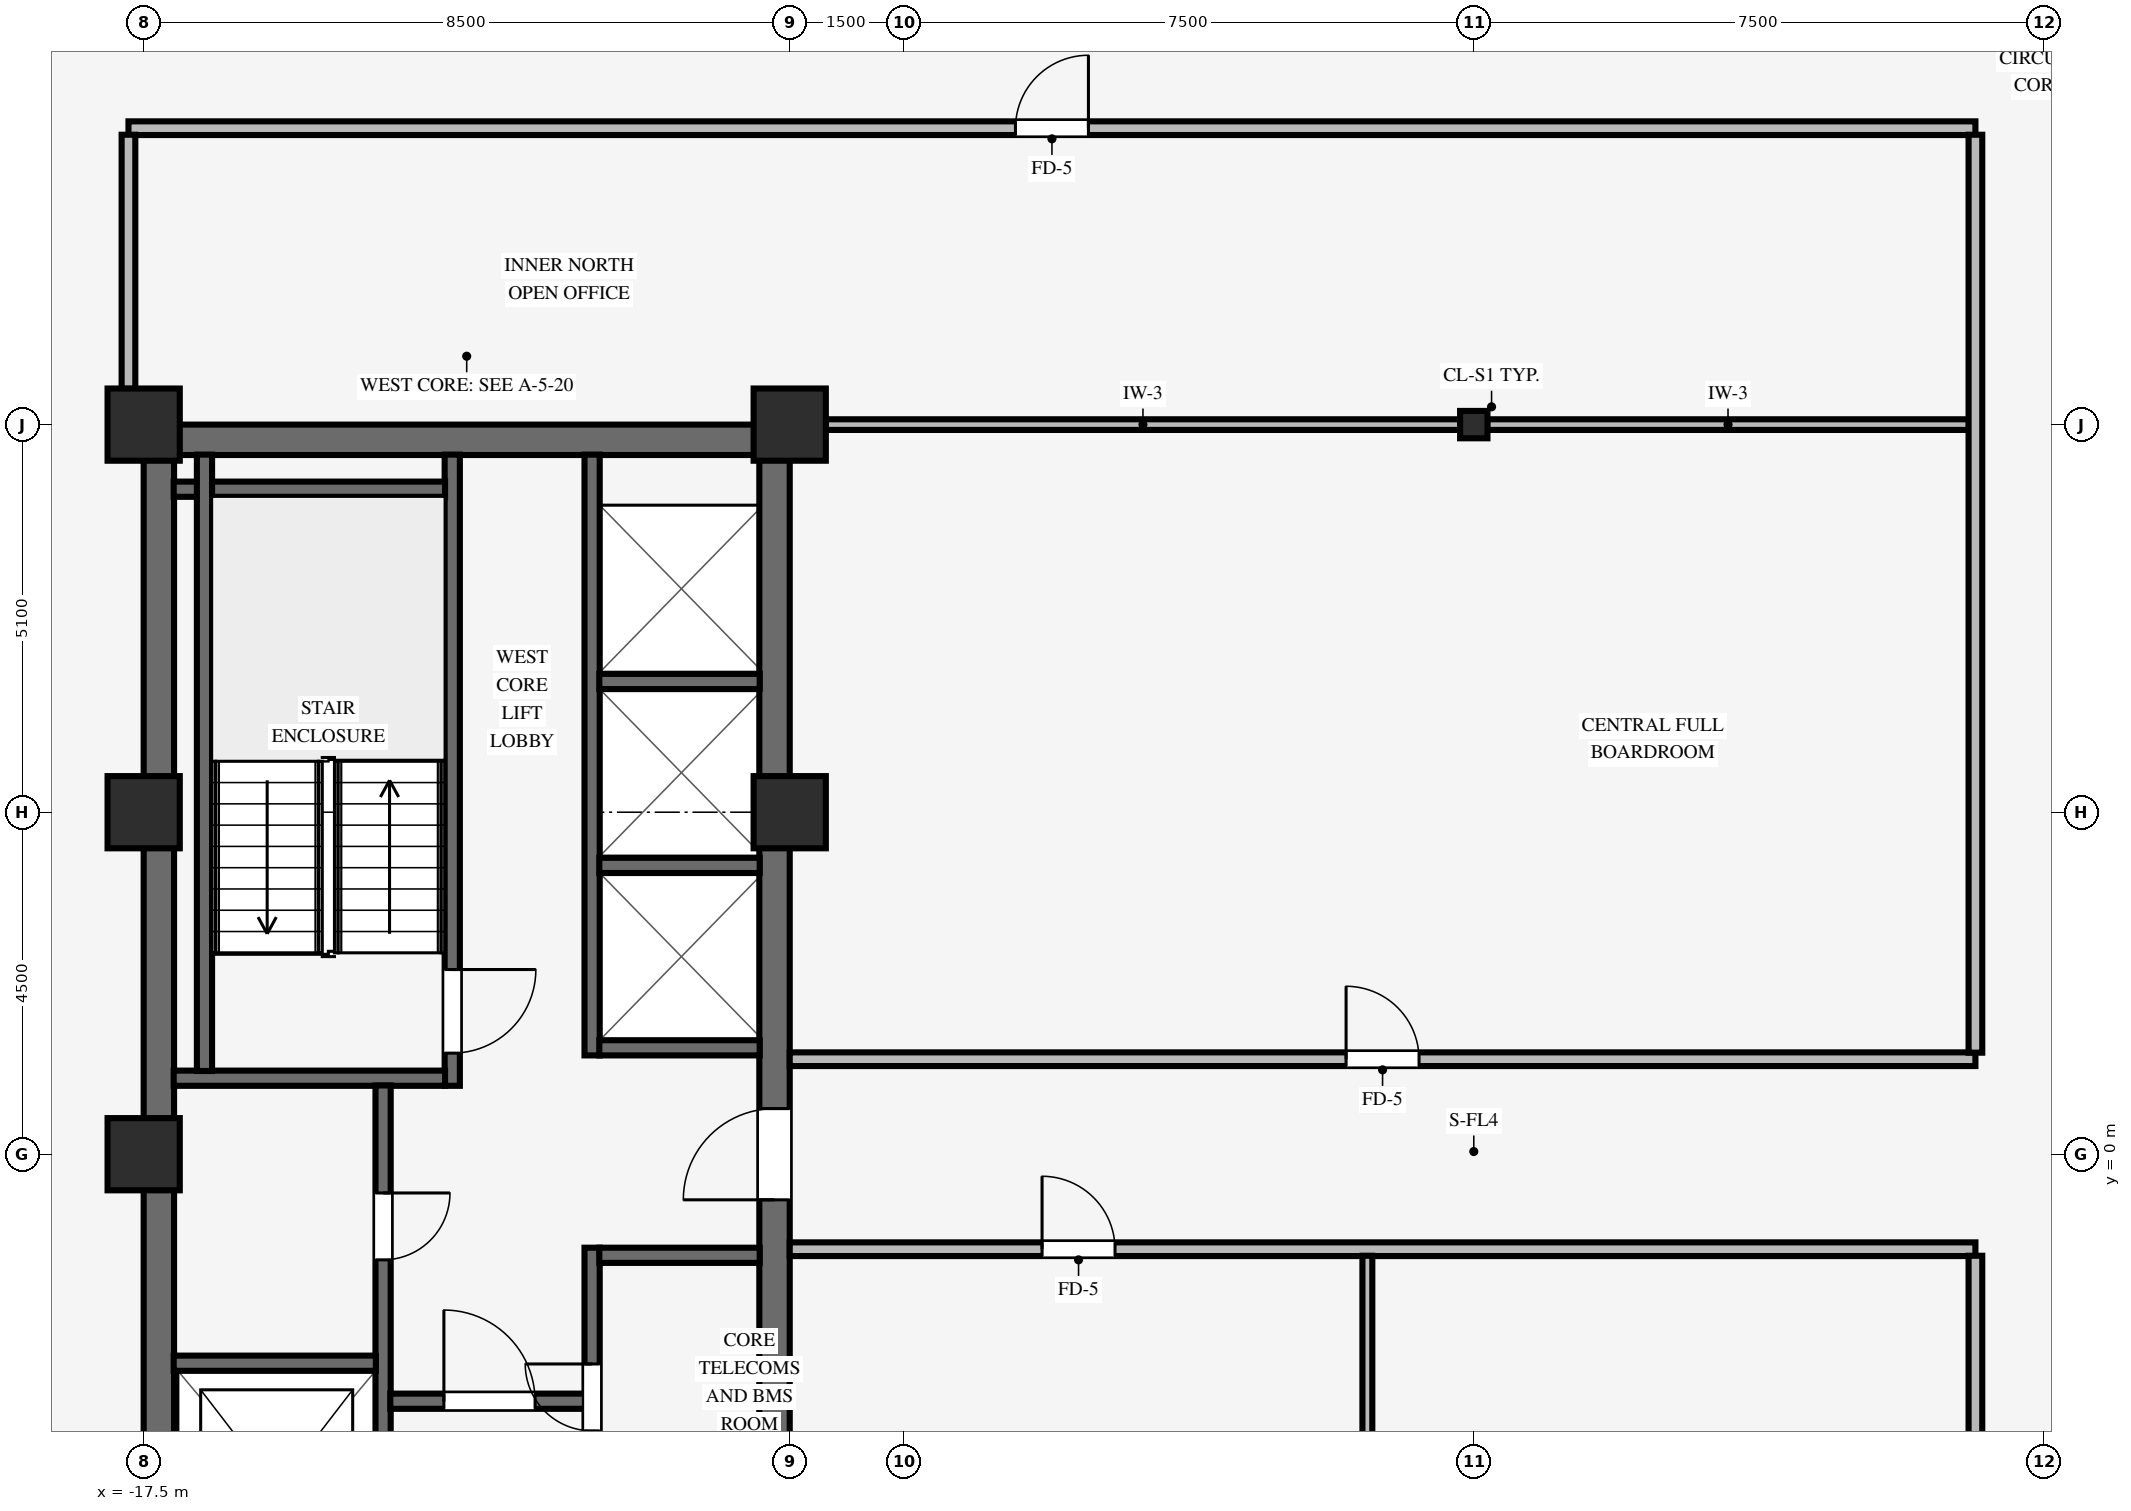
"""IFC4 building model, lengths in metres.
Left out: names, types, materials, properties, quantities, classifications, styles, units other than length and angle.
Written with IfcOpenShell. Run it as: python <this file> out.ifc"""

import sys

from ifc_helpers import new_model, si_unit, direction, frame, frame_2d, origin, origin_2d, place, context, subcontext, project, spatial, rectangle, i_section, extrude, source, transform, mapped, element, fill, save


model = new_model("IFC4")
c1 = context("Model", 3, precision=1e-05, world=origin(), true_north=direction((0.0, 1.0)))
c2 = subcontext(c1, "Body", "Model", "MODEL_VIEW")
j1 = project(units=[si_unit("LENGTHUNIT", "METRE"), si_unit("PLANEANGLEUNIT", "RADIAN")], contexts=[c1])
p1 = place(None, origin())
s1 = spatial("IfcSite", under=j1, at=p1, CompositionType="ELEMENT")
p2 = place(p1, origin())
s2 = spatial("IfcBuilding", under=s1, at=p2, CompositionType="ELEMENT")
p3 = place(p2, frame((0.0, 0.0, 156.7)))
s3 = spatial("IfcBuildingStorey", under=s2, at=p3, CompositionType="ELEMENT", Elevation=156.7)
p4 = place(p3, frame((-17.5, 9.4, 0.0), z_axis=(0.0, 0.0, 1.0), x_axis=(1.0, 0.0, 0.0)))
e1 = element("IfcWall", 1, at=p4, inside=s3, PredefinedType="SHEAR", context=c2, shape_type="SweptSolid", body=[
    extrude(rectangle(XDim=8.5, YDim=0.4, at=frame_2d((4.25, 0.0))), origin(), (0.0, 0.0, 1.0), 3.37),
])
p5 = place(p3, frame((-17.3, -9.205, 0.0), z_axis=(0.0, 0.0, 1.0), x_axis=(0.0, 1.0, 0.0)))
e2 = element("IfcWall", 2, at=p5, inside=s3, PredefinedType="SHEAR", context=c2, shape_type="SweptSolid", body=[
    extrude(rectangle(XDim=18.41, YDim=0.4, at=frame_2d((9.205, 0.0))), origin(), (0.0, 0.0, 1.0), 3.37),
])
p6 = place(p3, frame((-9.2, -9.205, 0.0), z_axis=(0.0, 0.0, 1.0), x_axis=(0.0, 1.0, 0.0)))
e3 = element("IfcWall", 3, at=p6, inside=s3, PredefinedType="SHEAR", context=c2, shape_type="SweptSolid", body=[
    extrude(rectangle(XDim=18.41, YDim=0.4, at=frame_2d((9.205, 0.0))), origin(), (0.0, 0.0, 1.0), 3.37),
])
p7 = place(p6, frame((8.605, 0.0, 0.0)))
e4 = element("IfcOpeningElement", 4, at=p7, cuts=e3, PredefinedType="OPENING", context=c2, shape_type="SweptSolid", body=[
    extrude(rectangle(XDim=1.2, YDim=2.15, at=frame_2d((0.6, 1.075))), frame((0.0, 0.21, 0.0), z_axis=(0.0, -1.0, 0.0), x_axis=(1.0, 0.0, 0.0)), (0.0, 0.0, 1.0), 0.42),
])
for number, where, z_axis, x_axis in (
    (5, (-17.5, 4.5, 0.0), (0.0, 0.0, 1.0), (1.0, 0.0, 0.0)),
    (6, (-17.5, 9.6, 0.0), (0.0, 0.0, 1.0), (1.0, 0.0, 0.0)),
    (7, (-9.0, 4.5, 0.0), (0.0, 0.0, 1.0), (1.0, 0.0, 0.0)),
    (8, (-9.0, 9.6, 0.0), (0.0, 0.0, 1.0), (1.0, 0.0, 0.0)),
    (9, (-17.5, 0.0, 0.0), (0.0, 0.0, 1.0), (1.0, 0.0, 0.0)),
):
    element("IfcColumn", number, at=place(p3, frame(where, z_axis=z_axis, x_axis=x_axis)), inside=s3, PredefinedType="COLUMN", context=c2, shape_type="SweptSolid", body=[
        extrude(rectangle(XDim=0.95, YDim=0.95, at=origin_2d()), origin(), (0.0, 0.0, 1.0), 3.37),
    ])
p8 = place(p3, frame((0.0, 9.6, 0.0), z_axis=(0.0, 0.0, 1.0), x_axis=(1.0, 0.0, 0.0)))
e10 = element("IfcColumn", 10, at=p8, inside=s3, PredefinedType="COLUMN", context=c2, shape_type="SweptSolid", body=[
    extrude(i_section(OverallWidth=0.36, OverallDepth=0.36, WebThickness=0.021, FlangeThickness=0.021, FilletRadius=0.018, at=origin_2d()), origin(), (0.0, 0.0, 1.0), 3.37),
])
p9 = place(p3, frame((-13.44, 0.9, 0.0), z_axis=(0.0, 0.0, 1.0), x_axis=(0.0, 1.0, 0.0)))
e11 = element("IfcWall", 11, at=p9, inside=s3, PredefinedType="SHEAR", context=c2, shape_type="SweptSolid", body=[
    extrude(rectangle(XDim=8.305, YDim=0.2, at=frame_2d((4.153, 0.0))), origin(), (0.0, 0.0, 1.0), 3.37),
])
p10 = place(p9, frame((1.53, 0.0, 0.0), z_axis=(0.0, 0.0, 1.0), x_axis=(-1.0, 0.0, 0.0)))
e12 = element("IfcOpeningElement", 12, at=p10, cuts=e11, PredefinedType="OPENING", context=c2, shape_type="SweptSolid", body=[
    extrude(rectangle(XDim=1.1, YDim=2.15, at=frame_2d((0.55, 1.075))), frame((0.0, 0.11, 0.0), z_axis=(0.0, -1.0, 0.0), x_axis=(1.0, 0.0, 0.0)), (0.0, 0.0, 1.0), 0.22),
])
for number, where, z_axis, x_axis in (
    (13, (-17.105, 1.0, 0.0), (0.0, 0.0, 1.0), (1.0, 0.0, 0.0)),
    (14, (-17.105, 8.75, 0.0), (0.0, 0.0, 1.0), (1.0, 0.0, 0.0)),
):
    element("IfcWall", number, at=place(p3, frame(where, z_axis=z_axis, x_axis=x_axis)), inside=s3, PredefinedType="SHEAR", context=c2, shape_type="SweptSolid", body=[
        extrude(rectangle(XDim=3.57, YDim=0.2, at=frame_2d((1.785, 0.0))), origin(), (0.0, 0.0, 1.0), 3.37),
    ])
p11 = place(p3, frame((-16.7, 1.095, 0.0), z_axis=(0.0, 0.0, 1.0), x_axis=(0.0, 1.0, 0.0)))
e15 = element("IfcWall", 15, at=p11, inside=s3, PredefinedType="SHEAR", context=c2, shape_type="SweptSolid", body=[
    extrude(rectangle(XDim=8.11, YDim=0.2, at=frame_2d((4.055, 0.0))), origin(), (0.0, 0.0, 1.0), 3.37),
])
p12 = place(p3, frame((-14.35, -6.2, 0.0), z_axis=(0.0, 0.0, 1.0), x_axis=(0.0, 1.0, 0.0)))
e16 = element("IfcWall", 16, at=p12, inside=s3, PredefinedType="SHEAR", context=c2, shape_type="SweptSolid", body=[
    extrude(rectangle(XDim=7.105, YDim=0.2, at=frame_2d((3.552, 0.0))), origin(), (0.0, 0.0, 1.0), 3.37),
])
p13 = place(p12, frame((5.69, 0.0, 0.0), z_axis=(0.0, 0.0, 1.0), x_axis=(-1.0, 0.0, 0.0)))
e17 = element("IfcOpeningElement", 17, at=p13, cuts=e16, PredefinedType="OPENING", context=c2, shape_type="SweptSolid", body=[
    extrude(rectangle(XDim=0.88, YDim=2.1, at=frame_2d((0.44, 1.05))), frame((0.0, 0.11, 0.0), z_axis=(0.0, -1.0, 0.0), x_axis=(1.0, 0.0, 0.0)), (0.0, 0.0, 1.0), 0.22),
])
p14 = place(p12, frame((1.15, 0.0, 0.0)))
e18 = element("IfcOpeningElement", 18, at=p14, cuts=e16, PredefinedType="OPENING", context=c2, shape_type="SweptSolid", body=[
    extrude(rectangle(XDim=1.3, YDim=2.2, at=frame_2d((0.65, 1.1))), frame((0.0, 0.11, 0.0), z_axis=(0.0, -1.0, 0.0), x_axis=(1.0, 0.0, 0.0)), (0.0, 0.0, 1.0), 0.22),
])
p15 = place(p3, frame((-17.105, -2.75, 0.0), z_axis=(0.0, 0.0, 1.0), x_axis=(1.0, 0.0, 0.0)))
e19 = element("IfcWall", 19, at=p15, inside=s3, PredefinedType="SHEAR", context=c2, shape_type="SweptSolid", body=[
    extrude(rectangle(XDim=2.66, YDim=0.2, at=frame_2d((1.33, 0.0))), origin(), (0.0, 0.0, 1.0), 3.37),
])
p16 = place(p3, frame((-11.6, -9.205, 0.0), z_axis=(0.0, 0.0, 1.0), x_axis=(0.0, 1.0, 0.0)))
e20 = element("IfcWall", 20, at=p16, inside=s3, PredefinedType="SHEAR", context=c2, shape_type="SweptSolid", body=[
    extrude(rectangle(XDim=7.975, YDim=0.2, at=frame_2d((3.988, 0.0))), origin(), (0.0, 0.0, 1.0), 3.37),
])
p17 = place(p16, frame((1.265, 0.0, 0.0)))
e21 = element("IfcOpeningElement", 21, at=p17, cuts=e20, PredefinedType="OPENING", context=c2, shape_type="SweptSolid", body=[
    extrude(rectangle(XDim=0.88, YDim=2.1, at=frame_2d((0.44, 1.05))), frame((0.0, 0.11, 0.0), z_axis=(0.0, -1.0, 0.0), x_axis=(1.0, 0.0, 0.0)), (0.0, 0.0, 1.0), 0.22),
])
p18 = place(p16, frame((5.565, 0.0, 0.0)))
e22 = element("IfcOpeningElement", 22, at=p18, cuts=e20, PredefinedType="OPENING", context=c2, shape_type="SweptSolid", body=[
    extrude(rectangle(XDim=0.88, YDim=2.1, at=frame_2d((0.44, 1.05))), frame((0.0, 0.11, 0.0), z_axis=(0.0, -1.0, 0.0), x_axis=(1.0, 0.0, 0.0)), (0.0, 0.0, 1.0), 0.22),
])
p19 = place(p3, frame((-14.255, -3.25, 0.0), z_axis=(0.0, 0.0, 1.0), x_axis=(1.0, 0.0, 0.0)))
e23 = element("IfcWall", 23, at=p19, inside=s3, PredefinedType="SHEAR", context=c2, shape_type="SweptSolid", body=[
    extrude(rectangle(XDim=2.56, YDim=0.2, at=frame_2d((1.28, 0.0))), origin(), (0.0, 0.0, 1.0), 3.37),
])
p20 = place(p19, frame((0.705, 0.0, 0.0)))
e24 = element("IfcOpeningElement", 24, at=p20, cuts=e23, PredefinedType="OPENING", context=c2, shape_type="SweptSolid", body=[
    extrude(rectangle(XDim=1.2, YDim=2.15, at=frame_2d((0.6, 1.075))), frame((0.0, 0.11, 0.0), z_axis=(0.0, -1.0, 0.0), x_axis=(1.0, 0.0, 0.0)), (0.0, 0.0, 1.0), 0.22),
])
p21 = place(p3, frame((-11.505, -1.33, 0.0), z_axis=(0.0, 0.0, 1.0), x_axis=(1.0, 0.0, 0.0)))
e25 = element("IfcWall", 25, at=p21, inside=s3, PredefinedType="SHEAR", context=c2, shape_type="SweptSolid", body=[
    extrude(rectangle(XDim=2.11, YDim=0.2, at=frame_2d((1.055, 0.0))), origin(), (0.0, 0.0, 1.0), 3.37),
])
p22 = place(p3, frame((-11.6, 1.3, 0.0), z_axis=(0.0, 0.0, 1.0), x_axis=(0.0, 1.0, 0.0)))
e26 = element("IfcWall", 26, at=p22, inside=s3, PredefinedType="SHEAR", context=c2, shape_type="SweptSolid", body=[
    extrude(rectangle(XDim=7.905, YDim=0.2, at=frame_2d((3.953, 0.0))), origin(), (0.0, 0.0, 1.0), 3.37),
])
for number, where, z_axis, x_axis in (
    (27, (-11.505, 1.4, 0.0), (0.0, 0.0, 1.0), (1.0, 0.0, 0.0)),
    (28, (-11.505, 3.8, 0.0), (0.0, 0.0, 1.0), (1.0, 0.0, 0.0)),
    (29, (-11.505, 6.22, 0.0), (0.0, 0.0, 1.0), (1.0, 0.0, 0.0)),
):
    element("IfcWall", number, at=place(p3, frame(where, z_axis=z_axis, x_axis=x_axis)), inside=s3, PredefinedType="SHEAR", context=c2, shape_type="SweptSolid", body=[
        extrude(rectangle(XDim=2.11, YDim=0.2, at=frame_2d((1.055, 0.0))), origin(), (0.0, 0.0, 1.0), 3.37),
    ])
p23 = place(p3, frame((-9.0, -1.25, 0.0), z_axis=(0.0, 0.0, 1.0), x_axis=(1.0, 0.0, 0.0)))
e30 = element("IfcWall", 30, at=p23, inside=s3, PredefinedType="PARTITIONING", context=c2, shape_type="SweptSolid", body=[
    extrude(rectangle(XDim=15.6, YDim=0.18, at=frame_2d((7.8, 0.0))), origin(), (0.0, 0.0, 1.0), 3.36),
])
p24 = place(p23, frame((3.32, 0.0, 0.0)))
e31 = element("IfcOpeningElement", 31, at=p24, cuts=e30, PredefinedType="OPENING", context=c2, shape_type="SweptSolid", body=[
    extrude(rectangle(XDim=0.96, YDim=2.1, at=frame_2d((0.48, 1.05))), frame((0.0, 0.1, 0.0), z_axis=(0.0, -1.0, 0.0), x_axis=(1.0, 0.0, 0.0)), (0.0, 0.0, 1.0), 0.2),
])
p25 = place(p3, frame((-9.0, 1.25, 0.0), z_axis=(0.0, 0.0, 1.0), x_axis=(1.0, 0.0, 0.0)))
e32 = element("IfcWall", 32, at=p25, inside=s3, PredefinedType="PARTITIONING", context=c2, shape_type="SweptSolid", body=[
    extrude(rectangle(XDim=15.6, YDim=0.18, at=frame_2d((7.8, 0.0))), origin(), (0.0, 0.0, 1.0), 3.36),
])
p26 = place(p25, frame((7.32, 0.0, 0.0)))
e33 = element("IfcOpeningElement", 33, at=p26, cuts=e32, PredefinedType="OPENING", context=c2, shape_type="SweptSolid", body=[
    extrude(rectangle(XDim=0.96, YDim=2.1, at=frame_2d((0.48, 1.05))), frame((0.0, 0.1, 0.0), z_axis=(0.0, -1.0, 0.0), x_axis=(1.0, 0.0, 0.0)), (0.0, 0.0, 1.0), 0.2),
])
p27 = place(p3, frame((-8.529, 9.6, 0.0), z_axis=(0.0, 0.0, 1.0), x_axis=(1.0, 0.0, 0.0)))
e34 = element("IfcWall", 34, at=p27, inside=s3, PredefinedType="PARTITIONING", context=c2, shape_type="SweptSolid", body=[
    extrude(rectangle(XDim=8.353, YDim=0.14, at=frame_2d((4.177, 0.0))), origin(), (0.0, 0.0, 1.0), 2.405),
])
p28 = place(p3, frame((0.176, 9.6, 0.0), z_axis=(0.0, 0.0, 1.0), x_axis=(1.0, 0.0, 0.0)))
e35 = element("IfcWall", 35, at=p28, inside=s3, PredefinedType="PARTITIONING", context=c2, shape_type="SweptSolid", body=[
    extrude(rectangle(XDim=6.338, YDim=0.14, at=frame_2d((3.169, 0.0))), origin(), (0.0, 0.0, 1.0), 2.405),
])
p29 = place(p3, frame((-17.7, 13.5, 0.0), z_axis=(0.0, 0.0, 1.0), x_axis=(1.0, 0.0, 0.0)))
e36 = element("IfcWall", 36, at=p29, inside=s3, PredefinedType="PARTITIONING", context=c2, shape_type="SweptSolid", body=[
    extrude(rectangle(XDim=24.3, YDim=0.18, at=frame_2d((12.15, 0.0))), origin(), (0.0, 0.0, 1.0), 2.998),
])
p30 = place(p29, frame((11.67, 0.0, 0.0)))
e37 = element("IfcOpeningElement", 37, at=p30, cuts=e36, PredefinedType="OPENING", context=c2, shape_type="SweptSolid", body=[
    extrude(rectangle(XDim=0.96, YDim=2.1, at=frame_2d((0.48, 1.05))), frame((0.0, 0.1, 0.0), z_axis=(0.0, -1.0, 0.0), x_axis=(1.0, 0.0, 0.0)), (0.0, 0.0, 1.0), 0.2),
])
p31 = place(p3, frame((-17.7, 10.071, 0.0), z_axis=(0.0, 0.0, 1.0), x_axis=(0.0, 1.0, 0.0)))
e38 = element("IfcWall", 38, at=p31, inside=s3, PredefinedType="PARTITIONING", context=c2, shape_type="SweptSolid", body=[
    extrude(rectangle(XDim=3.343, YDim=0.18, at=frame_2d((1.671, 0.0))), origin(), (0.0, 0.0, 1.0), 2.816),
])
p32 = place(p3, frame((-1.4, -9.524, 0.0), z_axis=(0.0, 0.0, 1.0), x_axis=(0.0, 1.0, 0.0)))
e39 = element("IfcWall", 39, at=p32, inside=s3, PredefinedType="PARTITIONING", context=c2, shape_type="SweptSolid", body=[
    extrude(rectangle(XDim=8.188, YDim=0.13, at=frame_2d((4.094, 0.0))), origin(), (0.0, 0.0, 1.0), 3.36),
])
p33 = place(p3, frame((6.6, -13.414, 0.0), z_axis=(0.0, 0.0, 1.0), x_axis=(0.0, 1.0, 0.0)))
e40 = element("IfcWall", 40, at=p33, inside=s3, PredefinedType="PARTITIONING", context=c2, shape_type="SweptSolid", body=[
    extrude(rectangle(XDim=12.078, YDim=0.18, at=frame_2d((6.039, 0.0))), origin(), (0.0, 0.0, 1.0), 3.36),
])
p34 = place(p33, frame((7.466, 0.0, 0.0)))
e41 = element("IfcOpeningElement", 41, at=p34, cuts=e40, PredefinedType="OPENING", context=c2, shape_type="SweptSolid", body=[
    extrude(rectangle(XDim=0.96, YDim=2.1, at=frame_2d((0.48, 1.05))), frame((0.0, 0.1, 0.0), z_axis=(0.0, -1.0, 0.0), x_axis=(1.0, 0.0, 0.0)), (0.0, 0.0, 1.0), 0.2),
])
p35 = place(p33, frame((1.457, 0.0, 0.0)))
e42 = element("IfcOpeningElement", 42, at=p35, cuts=e40, PredefinedType="OPENING", context=c2, shape_type="SweptSolid", body=[
    extrude(rectangle(XDim=0.9, YDim=2.1, at=frame_2d((0.45, 1.05))), frame((0.0, 0.1, 0.0), z_axis=(0.0, -1.0, 0.0), x_axis=(1.0, 0.0, 0.0)), (0.0, 0.0, 1.0), 0.2),
])
p36 = place(p3, frame((6.6, 1.336, 0.0), z_axis=(0.0, 0.0, 1.0), x_axis=(0.0, 1.0, 0.0)))
e43 = element("IfcWall", 43, at=p36, inside=s3, PredefinedType="PARTITIONING", context=c2, shape_type="SweptSolid", body=[
    extrude(rectangle(XDim=12.078, YDim=0.18, at=frame_2d((6.039, 0.0))), origin(), (0.0, 0.0, 1.0), 3.36),
])
m1 = source(origin(), c2, "Body", "SweptSolid", [
    extrude(rectangle(XDim=1.1, YDim=2.15, at=frame_2d((0.55, 1.075))), frame((0.0, 0.025, 0.0), z_axis=(0.0, -1.0, 0.0), x_axis=(1.0, 0.0, 0.0)), (0.0, 0.0, 1.0), 0.05),
])
p37 = place(p10, origin())
e44 = element("IfcDoor", 44, at=p37, inside=s3, OperationType="SINGLE_SWING_LEFT", PredefinedType="DOOR", context=c2, shape_type="MappedRepresentation", body=[
    mapped(m1, transform((0.0, 0.0, 0.0), scale=1.0)),
])
fill(e12, e44)
m2 = source(origin(), c2, "Body", "SweptSolid", [
    extrude(rectangle(XDim=0.88, YDim=2.1, at=frame_2d((0.44, 1.05))), frame((0.0, 0.025, 0.0), z_axis=(0.0, -1.0, 0.0), x_axis=(1.0, 0.0, 0.0)), (0.0, 0.0, 1.0), 0.05),
])
p38 = place(p13, origin())
e45 = element("IfcDoor", 45, at=p38, inside=s3, OperationType="SINGLE_SWING_LEFT", PredefinedType="DOOR", context=c2, shape_type="MappedRepresentation", body=[
    mapped(m2, transform((0.0, 0.0, 0.0), scale=1.0)),
])
fill(e17, e45)
m3 = source(origin(), c2, "Body", "SweptSolid", [
    extrude(rectangle(XDim=1.2, YDim=2.15, at=frame_2d((0.6, 1.075))), frame((0.0, 0.025, 0.0), z_axis=(0.0, -1.0, 0.0), x_axis=(1.0, 0.0, 0.0)), (0.0, 0.0, 1.0), 0.05),
])
p39 = place(p20, origin())
e46 = element("IfcDoor", 46, at=p39, inside=s3, OperationType="SINGLE_SWING_LEFT", PredefinedType="DOOR", context=c2, shape_type="MappedRepresentation", body=[
    mapped(m3, transform((0.0, 0.0, 0.0), scale=1.0)),
])
fill(e24, e46)
p40 = place(p18, origin())
e47 = element("IfcDoor", 47, at=p40, inside=s3, OperationType="SINGLE_SWING_RIGHT", PredefinedType="DOOR", context=c2, shape_type="MappedRepresentation", body=[
    mapped(m2, transform((0.0, 0.0, 0.0), scale=1.0)),
])
fill(e22, e47)
p41 = place(p7, origin())
e48 = element("IfcDoor", 48, at=p41, inside=s3, OperationType="SINGLE_SWING_LEFT", PredefinedType="DOOR", context=c2, shape_type="MappedRepresentation", body=[
    mapped(m3, transform((0.0, 0.0, 0.0), scale=1.0)),
])
fill(e4, e48)
m4 = source(origin(), c2, "Body", "SweptSolid", [
    extrude(rectangle(XDim=0.96, YDim=2.1, at=frame_2d((0.48, 1.05))), frame((0.0, 0.025, 0.0), z_axis=(0.0, -1.0, 0.0), x_axis=(1.0, 0.0, 0.0)), (0.0, 0.0, 1.0), 0.05),
])
p42 = place(p30, origin())
e49 = element("IfcDoor", 49, at=p42, inside=s3, OperationType="SINGLE_SWING_RIGHT", PredefinedType="DOOR", context=c2, shape_type="MappedRepresentation", body=[
    mapped(m4, transform((0.0, 0.0, 0.0), scale=1.0)),
])
fill(e37, e49)
p43 = place(p26, origin())
e50 = element("IfcDoor", 50, at=p43, inside=s3, OperationType="SINGLE_SWING_LEFT", PredefinedType="DOOR", context=c2, shape_type="MappedRepresentation", body=[
    mapped(m4, transform((0.0, 0.0, 0.0), scale=1.0)),
])
fill(e33, e50)
p44 = place(p24, origin())
e51 = element("IfcDoor", 51, at=p44, inside=s3, OperationType="SINGLE_SWING_LEFT", PredefinedType="DOOR", context=c2, shape_type="MappedRepresentation", body=[
    mapped(m4, transform((0.0, 0.0, 0.0), scale=1.0)),
])
fill(e31, e51)
save(model, sys.argv[1])
